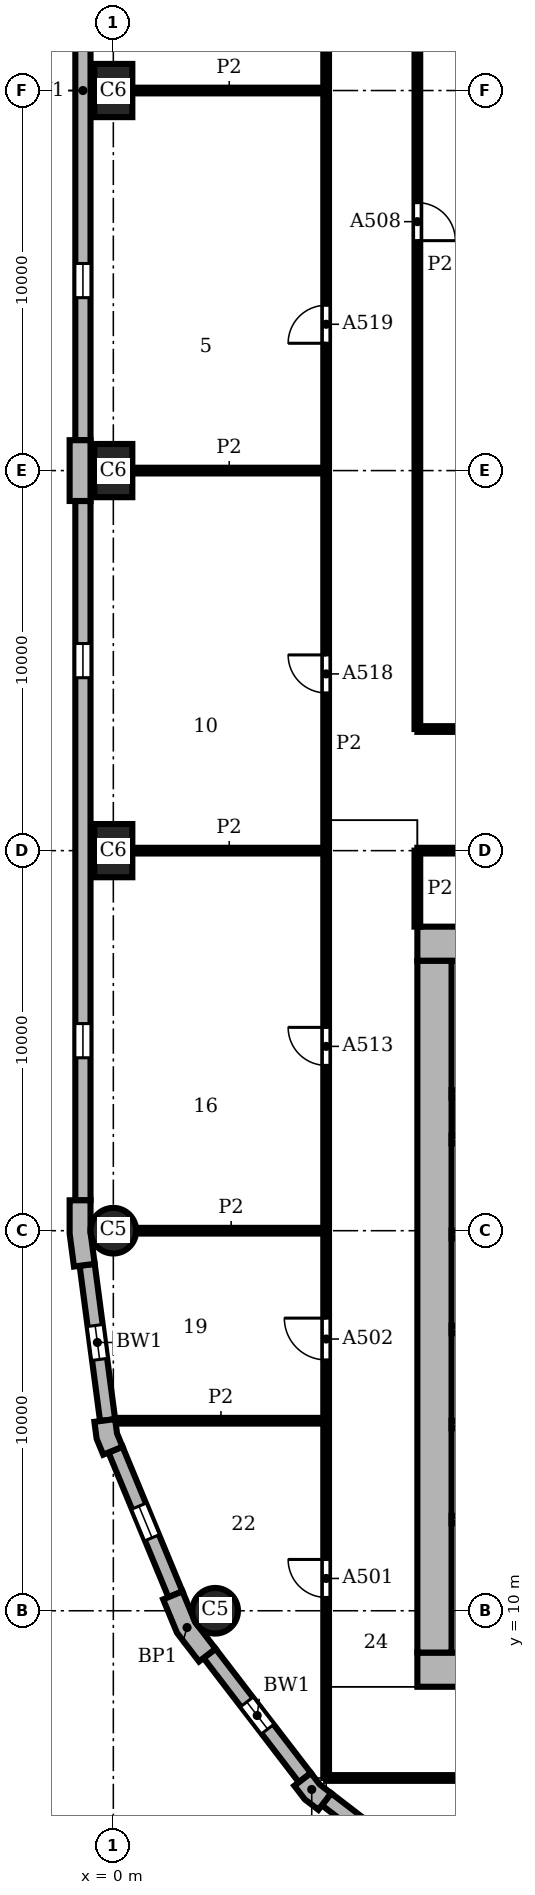
"""IFC4 building model, lengths in metres.
Left out: names, types, materials, properties, quantities, classifications, styles, units other than length and angle.
Written with IfcOpenShell. Run it as: python <this file> out.ifc"""

import sys

from ifc_helpers import new_model, si_unit, direction, frame, frame_2d, origin, origin_2d, place, context, subcontext, project, spatial, polyline, rectangle, circle, outline, extrude, element, fill, save


model = new_model("IFC4")
c1 = context("Model", 3, precision=1e-05, world=origin(), true_north=direction((0.0, 1.0)))
c2 = subcontext(c1, "Body", "Model", "MODEL_VIEW")
j1 = project(units=[si_unit("LENGTHUNIT", "METRE"), si_unit("PLANEANGLEUNIT", "RADIAN")], contexts=[c1])
p1 = place(None, origin())
s1 = spatial("IfcSite", under=j1, at=p1, CompositionType="ELEMENT")
p2 = place(p1, origin())
s2 = spatial("IfcBuilding", under=s1, at=p2, CompositionType="ELEMENT")
p3 = place(p2, frame((0.0, 0.0, 58.8)))
s3 = spatial("IfcBuildingStorey", under=s2, at=p3, CompositionType="ELEMENT", Elevation=58.8)
for number, where, z_axis, x_axis in (
    (1, (0.0, 50.0, 0.0), (0.0, 0.0, 1.0), (0.0, 1.0, 0.0)),
    (2, (0.0, 40.0, 0.0), (0.0, 0.0, 1.0), (0.0, 1.0, 0.0)),
    (3, (0.0, 30.0, 0.0), (0.0, 0.0, 1.0), (0.0, 1.0, 0.0)),
):
    element("IfcColumn", number, at=place(p3, frame(where, z_axis=z_axis, x_axis=x_axis)), inside=s3, PredefinedType="COLUMN", context=c2, shape_type="SweptSolid", body=[
        extrude(rectangle(XDim=1.4, YDim=1.0, at=origin_2d()), origin(), (0.0, 0.0, 1.0), 3.9),
    ])
for number, where, z_axis, x_axis in (
    (4, (0.0, 20.0, 0.0), (0.0, 0.0, 1.0), (1.0, 0.0, 0.0)),
    (5, (2.679, 10.0, 0.0), (0.0, 0.0, 1.0), (1.0, 0.0, 0.0)),
):
    element("IfcColumn", number, at=place(p3, frame(where, z_axis=z_axis, x_axis=x_axis)), inside=s3, PredefinedType="COLUMN", context=c2, shape_type="SweptSolid", body=[
        extrude(circle(Radius=0.6, at=origin_2d()), origin(), (0.0, 0.0, 1.0), 3.9),
    ])
for number, where, z_axis, x_axis in (
    (6, (8.0, 8.45, 0.0), (0.0, 0.0, 1.0), (1.0, 0.0, 0.0)),
    (7, (28.0, 27.55, 0.0), (0.0, 0.0, 1.0), (-1.0, 0.0, 0.0)),
):
    element("IfcWall", number, at=place(p3, frame(where, z_axis=z_axis, x_axis=x_axis)), inside=s3, PredefinedType="SHEAR", context=c2, shape_type="SweptSolid", body=[
        extrude(rectangle(XDim=20.0, YDim=0.9, at=frame_2d((10.0, 0.0))), origin(), (0.0, 0.0, 1.0), 3.9),
    ])
p4 = place(p3, frame((8.45, 27.1, 0.0), z_axis=(0.0, 0.0, 1.0), x_axis=(0.0, -1.0, 0.0)))
e8 = element("IfcWall", 8, at=p4, inside=s3, PredefinedType="SHEAR", context=c2, shape_type="SweptSolid", body=[
    extrude(rectangle(XDim=18.2, YDim=0.9, at=frame_2d((9.1, 0.0))), origin(), (0.0, 0.0, 1.0), 3.9),
])
p5 = place(p3, origin())
e9 = element("IfcWall", 9, at=p5, inside=s3, PredefinedType="SOLIDWALL", context=c2, shape_type="SweptSolid", body=[
    extrude(outline(polyline([(-1.0, 40.8), (-1.15, 40.8), (-1.15, 40.0), (-1.15, 39.2), (-1.0, 39.2), (-0.6, 39.2), (-0.6, 40.0), (-0.6, 40.8), (-1.0, 40.8)])), origin(), (0.0, 0.0, 1.0), 3.9),
])
e10 = element("IfcWall", 10, at=p5, inside=s3, PredefinedType="SOLIDWALL", context=c2, shape_type="SweptSolid", body=[
    extrude(outline(polyline([(-1.0, 20.8), (-1.15, 20.8), (-1.15, 19.925), (-1.036, 19.057), (-0.887, 19.076), (-0.49, 19.128), (-0.6, 19.961), (-0.6, 20.8), (-1.0, 20.8)])), origin(), (0.0, 0.0, 1.0), 3.9),
])
e11 = element("IfcWall", 11, at=p5, inside=s3, PredefinedType="SOLIDWALL", context=c2, shape_type="SweptSolid", body=[
    extrude(outline(polyline([(-0.349, 14.99), (-0.498, 14.971), (-0.439, 14.523), (-0.266, 14.106), (-0.128, 14.164), (0.242, 14.317), (0.097, 14.667), (0.047, 15.043), (-0.349, 14.99)])), origin(), (0.0, 0.0, 1.0), 3.9),
])
e12 = element("IfcWall", 12, at=p5, inside=s3, PredefinedType="SOLIDWALL", context=c2, shape_type="SweptSolid", body=[
    extrude(outline(polyline([(1.449, 10.356), (1.311, 10.299), (1.675, 9.42), (2.254, 8.665), (2.373, 8.757), (2.69, 9.0), (2.155, 9.698), (1.819, 10.51), (1.449, 10.356)])), origin(), (0.0, 0.0, 1.0), 3.9),
])
e13 = element("IfcWall", 13, at=p5, inside=s3, PredefinedType="SOLIDWALL", context=c2, shape_type="SweptSolid", body=[
    extrude(outline(polyline([(4.882, 5.487), (4.763, 5.396), (5.038, 5.038), (5.396, 4.763), (5.487, 4.882), (5.731, 5.199), (5.43, 5.43), (5.199, 5.731), (4.882, 5.487)])), origin(), (0.0, 0.0, 1.0), 3.9),
])
p6 = place(p3, frame((-0.8, 59.2, 0.0), z_axis=(0.0, 0.0, 1.0), x_axis=(0.0, -1.0, 0.0)))
e14 = element("IfcWall", 14, at=p6, inside=s3, PredefinedType="SOLIDWALL", context=c2, shape_type="SweptSolid", body=[
    extrude(rectangle(XDim=18.4, YDim=0.4, at=frame_2d((9.2, 0.0))), origin(), (0.0, 0.0, 1.0), 3.9),
])
p7 = place(p6, frame((3.75, 0.0, 0.9)))
e15 = element("IfcOpeningElement", 15, at=p7, cuts=e14, PredefinedType="OPENING", context=c2, shape_type="SweptSolid", body=[
    extrude(rectangle(XDim=0.9, YDim=2.35, at=frame_2d((0.45, 1.175))), frame((0.0, 0.21, 0.0), z_axis=(0.0, -1.0, 0.0), x_axis=(1.0, 0.0, 0.0)), (0.0, 0.0, 1.0), 0.42),
])
p8 = place(p6, frame((13.75, 0.0, 0.9)))
e16 = element("IfcOpeningElement", 16, at=p8, cuts=e14, PredefinedType="OPENING", context=c2, shape_type="SweptSolid", body=[
    extrude(rectangle(XDim=0.9, YDim=2.35, at=frame_2d((0.45, 1.175))), frame((0.0, 0.21, 0.0), z_axis=(0.0, -1.0, 0.0), x_axis=(1.0, 0.0, 0.0)), (0.0, 0.0, 1.0), 0.42),
])
p9 = place(p3, frame((-0.8, 39.2, 0.0), z_axis=(0.0, 0.0, 1.0), x_axis=(0.0, -1.0, 0.0)))
e17 = element("IfcWall", 17, at=p9, inside=s3, PredefinedType="SOLIDWALL", context=c2, shape_type="SweptSolid", body=[
    extrude(rectangle(XDim=18.4, YDim=0.4, at=frame_2d((9.2, 0.0))), origin(), (0.0, 0.0, 1.0), 3.9),
])
p10 = place(p9, frame((3.75, 0.0, 0.9)))
e18 = element("IfcOpeningElement", 18, at=p10, cuts=e17, PredefinedType="OPENING", context=c2, shape_type="SweptSolid", body=[
    extrude(rectangle(XDim=0.9, YDim=2.35, at=frame_2d((0.45, 1.175))), frame((0.0, 0.21, 0.0), z_axis=(0.0, -1.0, 0.0), x_axis=(1.0, 0.0, 0.0)), (0.0, 0.0, 1.0), 0.42),
])
p11 = place(p9, frame((13.75, 0.0, 0.9)))
e19 = element("IfcOpeningElement", 19, at=p11, cuts=e17, PredefinedType="OPENING", context=c2, shape_type="SweptSolid", body=[
    extrude(rectangle(XDim=0.9, YDim=2.35, at=frame_2d((0.45, 1.175))), frame((0.0, 0.21, 0.0), z_axis=(0.0, -1.0, 0.0), x_axis=(1.0, 0.0, 0.0)), (0.0, 0.0, 1.0), 0.42),
])
p12 = place(p3, frame((-0.689, 19.102, 0.0), z_axis=(0.0, 0.0, 1.0), x_axis=(0.130514280502, -0.991446429508, 0.0)))
e20 = element("IfcWall", 20, at=p12, inside=s3, PredefinedType="SOLIDWALL", context=c2, shape_type="SweptSolid", body=[
    extrude(rectangle(XDim=4.121, YDim=0.4, at=frame_2d((2.061, 0.0))), origin(), (0.0, 0.0, 1.0), 3.9),
])
p13 = place(p12, frame((1.611, 0.0, 0.9)))
e21 = element("IfcOpeningElement", 21, at=p13, cuts=e20, PredefinedType="OPENING", context=c2, shape_type="SweptSolid", body=[
    extrude(rectangle(XDim=0.9, YDim=2.35, at=frame_2d((0.45, 1.175))), frame((0.0, 0.21, 0.0), z_axis=(0.0, -1.0, 0.0), x_axis=(1.0, 0.0, 0.0)), (0.0, 0.0, 1.0), 0.42),
])
p14 = place(p3, frame((0.057, 14.24, 0.0), z_axis=(0.0, 0.0, 1.0), x_axis=(0.382721546029, -0.923863744394, 0.0)))
e22 = element("IfcWall", 22, at=p14, inside=s3, PredefinedType="SOLIDWALL", context=c2, shape_type="SweptSolid", body=[
    extrude(rectangle(XDim=4.121, YDim=0.4, at=frame_2d((2.061, 0.0))), origin(), (0.0, 0.0, 1.0), 3.9),
])
p15 = place(p14, frame((1.611, 0.0, 0.9)))
e23 = element("IfcOpeningElement", 23, at=p15, cuts=e22, PredefinedType="OPENING", context=c2, shape_type="SweptSolid", body=[
    extrude(rectangle(XDim=0.9, YDim=2.35, at=frame_2d((0.45, 1.175))), frame((0.0, 0.21, 0.0), z_axis=(0.0, -1.0, 0.0), x_axis=(1.0, 0.0, 0.0)), (0.0, 0.0, 1.0), 0.42),
])
p16 = place(p3, frame((2.532, 8.878, 0.0), z_axis=(0.0, 0.0, 1.0), x_axis=(0.608759824817, -0.793354571229, 0.0)))
e24 = element("IfcWall", 24, at=p16, inside=s3, PredefinedType="SOLIDWALL", context=c2, shape_type="SweptSolid", body=[
    extrude(rectangle(XDim=4.121, YDim=0.4, at=frame_2d((2.061, 0.0))), origin(), (0.0, 0.0, 1.0), 3.9),
])
p17 = place(p16, frame((1.611, 0.0, 0.9)))
e25 = element("IfcOpeningElement", 25, at=p17, cuts=e24, PredefinedType="OPENING", context=c2, shape_type="SweptSolid", body=[
    extrude(rectangle(XDim=0.9, YDim=2.35, at=frame_2d((0.45, 1.175))), frame((0.0, 0.21, 0.0), z_axis=(0.0, -1.0, 0.0), x_axis=(1.0, 0.0, 0.0)), (0.0, 0.0, 1.0), 0.42),
])
p18 = place(p3, frame((5.609, 5.041, 0.0), z_axis=(0.0, 0.0, 1.0), x_axis=(0.793354571229, -0.608759824817, 0.0)))
e26 = element("IfcWall", 26, at=p18, inside=s3, PredefinedType="SOLIDWALL", context=c2, shape_type="SweptSolid", body=[
    extrude(rectangle(XDim=4.121, YDim=0.4, at=frame_2d((2.061, 0.0))), origin(), (0.0, 0.0, 1.0), 3.9),
])
p19 = place(p18, frame((1.611, 0.0, 0.9)))
e27 = element("IfcOpeningElement", 27, at=p19, cuts=e26, PredefinedType="OPENING", context=c2, shape_type="SweptSolid", body=[
    extrude(rectangle(XDim=0.9, YDim=2.35, at=frame_2d((0.45, 1.175))), frame((0.0, 0.21, 0.0), z_axis=(0.0, -1.0, 0.0), x_axis=(1.0, 0.0, 0.0)), (0.0, 0.0, 1.0), 0.42),
])
p20 = place(p3, frame((8.9, 12.4, 0.0), z_axis=(0.0, 0.0, 1.0), x_axis=(1.0, 0.0, 0.0)))
e28 = element("IfcWall", 28, at=p20, inside=s3, PredefinedType="SHEAR", context=c2, shape_type="SweptSolid", body=[
    extrude(rectangle(XDim=4.9, YDim=0.2, at=frame_2d((2.45, 0.0))), origin(), (0.0, 0.0, 1.0), 3.58),
])
for number, where, z_axis, x_axis in (
    (29, (8.9, 14.9, 0.0), (0.0, 0.0, 1.0), (1.0, 0.0, 0.0)),
    (30, (8.9, 17.4, 0.0), (0.0, 0.0, 1.0), (1.0, 0.0, 0.0)),
    (31, (8.9, 19.9, 0.0), (0.0, 0.0, 1.0), (1.0, 0.0, 0.0)),
    (32, (8.9, 22.4, 0.0), (0.0, 0.0, 1.0), (1.0, 0.0, 0.0)),
):
    element("IfcWall", number, at=place(p3, frame(where, z_axis=z_axis, x_axis=x_axis)), inside=s3, PredefinedType="SHEAR", context=c2, shape_type="SweptSolid", body=[
        extrude(rectangle(XDim=2.8, YDim=0.2, at=frame_2d((1.4, 0.0))), origin(), (0.0, 0.0, 1.0), 3.58),
    ])
p21 = place(p3, frame((8.9, 23.6, 0.0), z_axis=(0.0, 0.0, 1.0), x_axis=(1.0, 0.0, 0.0)))
e33 = element("IfcWall", 33, at=p21, inside=s3, PredefinedType="SHEAR", context=c2, shape_type="SweptSolid", body=[
    extrude(rectangle(XDim=4.9, YDim=0.2, at=frame_2d((2.45, 0.0))), origin(), (0.0, 0.0, 1.0), 3.58),
])
p22 = place(p3, frame((5.6, 5.6, 0.0), z_axis=(0.0, 0.0, 1.0), x_axis=(0.0, 1.0, 0.0)))
e34 = element("IfcWall", 34, at=p22, inside=s3, PredefinedType="PARTITIONING", context=c2, shape_type="SweptSolid", body=[
    extrude(rectangle(XDim=54.4, YDim=0.15, at=frame_2d((27.2, 0.0))), origin(), (0.0, 0.0, 1.0), 3.58),
])
p23 = place(p22, frame((4.75, 0.0, 0.0)))
e35 = element("IfcOpeningElement", 35, at=p23, cuts=e34, PredefinedType="OPENING", context=c2, shape_type="SweptSolid", body=[
    extrude(rectangle(XDim=1.0, YDim=2.1, at=frame_2d((0.5, 1.05))), frame((0.0, 0.085, 0.0), z_axis=(0.0, -1.0, 0.0), x_axis=(1.0, 0.0, 0.0)), (0.0, 0.0, 1.0), 0.17),
])
p24 = place(p22, frame((11.0, 0.0, 0.0)))
e36 = element("IfcOpeningElement", 36, at=p24, cuts=e34, PredefinedType="OPENING", context=c2, shape_type="SweptSolid", body=[
    extrude(rectangle(XDim=1.1, YDim=2.1, at=frame_2d((0.55, 1.05))), frame((0.0, 0.085, 0.0), z_axis=(0.0, -1.0, 0.0), x_axis=(1.0, 0.0, 0.0)), (0.0, 0.0, 1.0), 0.17),
])
p25 = place(p22, frame((18.75, 0.0, 0.0)))
e37 = element("IfcOpeningElement", 37, at=p25, cuts=e34, PredefinedType="OPENING", context=c2, shape_type="SweptSolid", body=[
    extrude(rectangle(XDim=1.0, YDim=2.1, at=frame_2d((0.5, 1.05))), frame((0.0, 0.085, 0.0), z_axis=(0.0, -1.0, 0.0), x_axis=(1.0, 0.0, 0.0)), (0.0, 0.0, 1.0), 0.17),
])
p26 = place(p22, frame((28.55, 0.0, 0.0)))
e38 = element("IfcOpeningElement", 38, at=p26, cuts=e34, PredefinedType="OPENING", context=c2, shape_type="SweptSolid", body=[
    extrude(rectangle(XDim=1.0, YDim=2.1, at=frame_2d((0.5, 1.05))), frame((0.0, 0.085, 0.0), z_axis=(0.0, -1.0, 0.0), x_axis=(1.0, 0.0, 0.0)), (0.0, 0.0, 1.0), 0.17),
])
p27 = place(p22, frame((37.75, 0.0, 0.0)))
e39 = element("IfcOpeningElement", 39, at=p27, cuts=e34, PredefinedType="OPENING", context=c2, shape_type="SweptSolid", body=[
    extrude(rectangle(XDim=1.0, YDim=2.1, at=frame_2d((0.5, 1.05))), frame((0.0, 0.085, 0.0), z_axis=(0.0, -1.0, 0.0), x_axis=(1.0, 0.0, 0.0)), (0.0, 0.0, 1.0), 0.17),
])
p28 = place(p22, frame((49.25, 0.0, 0.0)))
e40 = element("IfcOpeningElement", 40, at=p28, cuts=e34, PredefinedType="OPENING", context=c2, shape_type="SweptSolid", body=[
    extrude(rectangle(XDim=1.0, YDim=2.1, at=frame_2d((0.5, 1.05))), frame((0.0, 0.085, 0.0), z_axis=(0.0, -1.0, 0.0), x_axis=(1.0, 0.0, 0.0)), (0.0, 0.0, 1.0), 0.17),
])
p29 = place(p3, frame((8.0, 28.0, 0.0), z_axis=(0.0, 0.0, 1.0), x_axis=(0.0, 1.0, 0.0)))
e41 = element("IfcWall", 41, at=p29, inside=s3, PredefinedType="PARTITIONING", context=c2, shape_type="SweptSolid", body=[
    extrude(rectangle(XDim=2.0, YDim=0.15, at=frame_2d((1.0, 0.0))), origin(), (0.0, 0.0, 1.0), 3.58),
])
p30 = place(p3, frame((8.0, 33.2, 0.0), z_axis=(0.0, 0.0, 1.0), x_axis=(0.0, 1.0, 0.0)))
e42 = element("IfcWall", 42, at=p30, inside=s3, PredefinedType="PARTITIONING", context=c2, shape_type="SweptSolid", body=[
    extrude(rectangle(XDim=24.4, YDim=0.15, at=frame_2d((12.2, 0.0))), origin(), (0.0, 0.0, 1.0), 3.58),
])
p31 = place(p30, frame((12.85, 0.0, 0.0)))
e43 = element("IfcOpeningElement", 43, at=p31, cuts=e42, PredefinedType="OPENING", context=c2, shape_type="SweptSolid", body=[
    extrude(rectangle(XDim=1.0, YDim=2.1, at=frame_2d((0.5, 1.05))), frame((0.0, 0.085, 0.0), z_axis=(0.0, -1.0, 0.0), x_axis=(1.0, 0.0, 0.0)), (0.0, 0.0, 1.0), 0.17),
])
p32 = place(p3, frame((5.6, 5.6, 0.0), z_axis=(0.0, 0.0, 1.0), x_axis=(1.0, 0.0, 0.0)))
e44 = element("IfcWall", 44, at=p32, inside=s3, PredefinedType="PARTITIONING", context=c2, shape_type="SweptSolid", body=[
    extrude(rectangle(XDim=25.4, YDim=0.15, at=frame_2d((12.7, 0.0))), origin(), (0.0, 0.0, 1.0), 3.58),
])
p33 = place(p3, frame((0.063, 15.0, 0.0), z_axis=(0.0, 0.0, 1.0), x_axis=(1.0, 0.0, 0.0)))
e45 = element("IfcWall", 45, at=p33, inside=s3, PredefinedType="PARTITIONING", context=c2, shape_type="SweptSolid", body=[
    extrude(rectangle(XDim=5.537, YDim=0.15, at=frame_2d((2.769, 0.0))), origin(), (0.0, 0.0, 1.0), 3.58),
])
p34 = place(p3, frame((0.6, 20.0, 0.0), z_axis=(0.0, 0.0, 1.0), x_axis=(1.0, 0.0, 0.0)))
e46 = element("IfcWall", 46, at=p34, inside=s3, PredefinedType="PARTITIONING", context=c2, shape_type="SweptSolid", body=[
    extrude(rectangle(XDim=5.0, YDim=0.15, at=frame_2d((2.5, 0.0))), origin(), (0.0, 0.0, 1.0), 3.58),
])
p35 = place(p3, frame((0.5, 30.0, 0.0), z_axis=(0.0, 0.0, 1.0), x_axis=(1.0, 0.0, 0.0)))
e47 = element("IfcWall", 47, at=p35, inside=s3, PredefinedType="PARTITIONING", context=c2, shape_type="SweptSolid", body=[
    extrude(rectangle(XDim=5.1, YDim=0.15, at=frame_2d((2.55, 0.0))), origin(), (0.0, 0.0, 1.0), 3.58),
])
p36 = place(p3, frame((8.0, 30.0, 0.0), z_axis=(0.0, 0.0, 1.0), x_axis=(1.0, 0.0, 0.0)))
e48 = element("IfcWall", 48, at=p36, inside=s3, PredefinedType="PARTITIONING", context=c2, shape_type="SweptSolid", body=[
    extrude(rectangle(XDim=1.2, YDim=0.15, at=frame_2d((0.6, 0.0))), origin(), (0.0, 0.0, 1.0), 3.58),
])
p37 = place(p3, frame((8.0, 33.2, 0.0), z_axis=(0.0, 0.0, 1.0), x_axis=(1.0, 0.0, 0.0)))
e49 = element("IfcWall", 49, at=p37, inside=s3, PredefinedType="PARTITIONING", context=c2, shape_type="SweptSolid", body=[
    extrude(rectangle(XDim=5.8, YDim=0.15, at=frame_2d((2.9, 0.0))), origin(), (0.0, 0.0, 1.0), 3.58),
])
for number, where, z_axis, x_axis in (
    (50, (0.5, 40.0, 0.0), (0.0, 0.0, 1.0), (1.0, 0.0, 0.0)),
    (51, (0.5, 50.0, 0.0), (0.0, 0.0, 1.0), (1.0, 0.0, 0.0)),
):
    element("IfcWall", number, at=place(p3, frame(where, z_axis=z_axis, x_axis=x_axis)), inside=s3, PredefinedType="PARTITIONING", context=c2, shape_type="SweptSolid", body=[
        extrude(rectangle(XDim=5.1, YDim=0.15, at=frame_2d((2.55, 0.0))), origin(), (0.0, 0.0, 1.0), 3.58),
    ])
p38 = place(p8, origin())
e52 = element("IfcWindow", 52, at=p38, inside=s3, PartitioningType="SINGLE_PANEL", PredefinedType="WINDOW", context=c2, shape_type="SweptSolid", body=[
    extrude(rectangle(XDim=0.9, YDim=2.35, at=frame_2d((0.45, 1.175))), frame((0.0, 0.16, 0.0), z_axis=(0.0, -1.0, 0.0), x_axis=(1.0, 0.0, 0.0)), (0.0, 0.0, 1.0), 0.06),
])
fill(e16, e52)
p39 = place(p10, origin())
e53 = element("IfcWindow", 53, at=p39, inside=s3, PartitioningType="SINGLE_PANEL", PredefinedType="WINDOW", context=c2, shape_type="SweptSolid", body=[
    extrude(rectangle(XDim=0.9, YDim=2.35, at=frame_2d((0.45, 1.175))), frame((0.0, 0.16, 0.0), z_axis=(0.0, -1.0, 0.0), x_axis=(1.0, 0.0, 0.0)), (0.0, 0.0, 1.0), 0.06),
])
fill(e18, e53)
p40 = place(p11, origin())
e54 = element("IfcWindow", 54, at=p40, inside=s3, PartitioningType="SINGLE_PANEL", PredefinedType="WINDOW", context=c2, shape_type="SweptSolid", body=[
    extrude(rectangle(XDim=0.9, YDim=2.35, at=frame_2d((0.45, 1.175))), frame((0.0, 0.16, 0.0), z_axis=(0.0, -1.0, 0.0), x_axis=(1.0, 0.0, 0.0)), (0.0, 0.0, 1.0), 0.06),
])
fill(e19, e54)
p41 = place(p13, origin())
e55 = element("IfcWindow", 55, at=p41, inside=s3, PartitioningType="SINGLE_PANEL", PredefinedType="WINDOW", context=c2, shape_type="SweptSolid", body=[
    extrude(rectangle(XDim=0.9, YDim=2.35, at=frame_2d((0.45, 1.175))), frame((0.0, 0.16, 0.0), z_axis=(0.0, -1.0, 0.0), x_axis=(1.0, 0.0, 0.0)), (0.0, 0.0, 1.0), 0.06),
])
fill(e21, e55)
p42 = place(p15, origin())
e56 = element("IfcWindow", 56, at=p42, inside=s3, PartitioningType="SINGLE_PANEL", PredefinedType="WINDOW", context=c2, shape_type="SweptSolid", body=[
    extrude(rectangle(XDim=0.9, YDim=2.35, at=frame_2d((0.45, 1.175))), frame((0.0, 0.16, 0.0), z_axis=(0.0, -1.0, 0.0), x_axis=(1.0, 0.0, 0.0)), (0.0, 0.0, 1.0), 0.06),
])
fill(e23, e56)
p43 = place(p17, origin())
e57 = element("IfcWindow", 57, at=p43, inside=s3, PartitioningType="SINGLE_PANEL", PredefinedType="WINDOW", context=c2, shape_type="SweptSolid", body=[
    extrude(rectangle(XDim=0.9, YDim=2.35, at=frame_2d((0.45, 1.175))), frame((0.0, 0.16, 0.0), z_axis=(0.0, -1.0, 0.0), x_axis=(1.0, 0.0, 0.0)), (0.0, 0.0, 1.0), 0.06),
])
fill(e25, e57)
p44 = place(p23, origin())
e58 = element("IfcDoor", 58, at=p44, inside=s3, OperationType="SINGLE_SWING_RIGHT", PredefinedType="DOOR", context=c2, shape_type="SweptSolid", body=[
    extrude(rectangle(XDim=1.0, YDim=2.1, at=frame_2d((0.5, 1.05))), frame((0.0, 0.025, 0.0), z_axis=(0.0, -1.0, 0.0), x_axis=(1.0, 0.0, 0.0)), (0.0, 0.0, 1.0), 0.05),
])
fill(e35, e58)
p45 = place(p24, origin())
e59 = element("IfcDoor", 59, at=p45, inside=s3, OperationType="SINGLE_SWING_RIGHT", PredefinedType="DOOR", context=c2, shape_type="SweptSolid", body=[
    extrude(rectangle(XDim=1.1, YDim=2.1, at=frame_2d((0.55, 1.05))), frame((0.0, 0.025, 0.0), z_axis=(0.0, -1.0, 0.0), x_axis=(1.0, 0.0, 0.0)), (0.0, 0.0, 1.0), 0.05),
])
fill(e36, e59)
p46 = place(p31, frame((1.0, 0.0, 0.0), z_axis=(0.0, 0.0, 1.0), x_axis=(-1.0, 0.0, 0.0)))
e60 = element("IfcDoor", 60, at=p46, inside=s3, OperationType="SINGLE_SWING_RIGHT", PredefinedType="DOOR", context=c2, shape_type="SweptSolid", body=[
    extrude(rectangle(XDim=1.0, YDim=2.1, at=frame_2d((0.5, 1.05))), frame((0.0, 0.025, 0.0), z_axis=(0.0, -1.0, 0.0), x_axis=(1.0, 0.0, 0.0)), (0.0, 0.0, 1.0), 0.05),
])
fill(e43, e60)
p47 = place(p25, origin())
e61 = element("IfcDoor", 61, at=p47, inside=s3, OperationType="SINGLE_SWING_RIGHT", PredefinedType="DOOR", context=c2, shape_type="SweptSolid", body=[
    extrude(rectangle(XDim=1.0, YDim=2.1, at=frame_2d((0.5, 1.05))), frame((0.0, 0.025, 0.0), z_axis=(0.0, -1.0, 0.0), x_axis=(1.0, 0.0, 0.0)), (0.0, 0.0, 1.0), 0.05),
])
fill(e37, e61)
p48 = place(p26, origin())
e62 = element("IfcDoor", 62, at=p48, inside=s3, OperationType="SINGLE_SWING_RIGHT", PredefinedType="DOOR", context=c2, shape_type="SweptSolid", body=[
    extrude(rectangle(XDim=1.0, YDim=2.1, at=frame_2d((0.5, 1.05))), frame((0.0, 0.025, 0.0), z_axis=(0.0, -1.0, 0.0), x_axis=(1.0, 0.0, 0.0)), (0.0, 0.0, 1.0), 0.05),
])
fill(e38, e62)
p49 = place(p27, origin())
e63 = element("IfcDoor", 63, at=p49, inside=s3, OperationType="SINGLE_SWING_LEFT", PredefinedType="DOOR", context=c2, shape_type="SweptSolid", body=[
    extrude(rectangle(XDim=1.0, YDim=2.1, at=frame_2d((0.5, 1.05))), frame((0.0, 0.025, 0.0), z_axis=(0.0, -1.0, 0.0), x_axis=(1.0, 0.0, 0.0)), (0.0, 0.0, 1.0), 0.05),
])
fill(e39, e63)
save(model, sys.argv[1])
